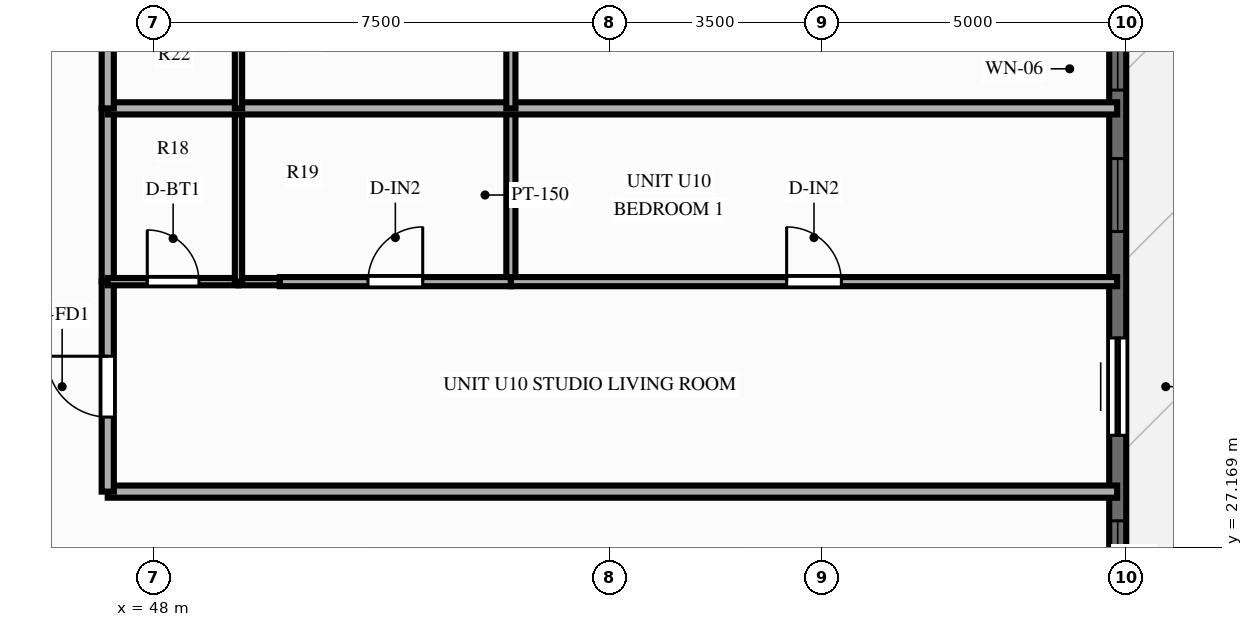
"""IFC4 building model, lengths in metres.
Left out: names, types, materials, properties, quantities, classifications, styles, units other than length and angle.
Written with IfcOpenShell. Run it as: python <this file> out.ifc"""

import sys

from ifc_helpers import new_model, si_unit, direction, frame, frame_2d, origin, place, context, subcontext, project, spatial, rectangle, extrude, source, transform, mapped, element, fill, save


model = new_model("IFC4")
c1 = context("Model", 3, precision=1e-05, world=origin(), true_north=direction((0.0, 1.0)))
c2 = subcontext(c1, "Body", "Model", "MODEL_VIEW")
j1 = project(units=[si_unit("LENGTHUNIT", "METRE"), si_unit("PLANEANGLEUNIT", "RADIAN")], contexts=[c1])
p1 = place(None, origin())
s1 = spatial("IfcSite", under=j1, at=p1, CompositionType="ELEMENT")
p2 = place(p1, origin())
s2 = spatial("IfcBuilding", under=s1, at=p2, CompositionType="ELEMENT")
p3 = place(p2, frame((0.0, 0.0, 92.85)))
s3 = spatial("IfcBuildingStorey", under=s2, at=p3, CompositionType="ELEMENT", Elevation=92.85)
p4 = place(p3, frame((63.86, 7.2, 0.0), z_axis=(0.0, 0.0, 1.0), x_axis=(0.0, 1.0, 0.0)))
e1 = element("IfcWall", 1, at=p4, inside=s3, PredefinedType="SOLIDWALL", context=c2, shape_type="SweptSolid", body=[
    extrude(rectangle(XDim=39.6, YDim=0.28, at=frame_2d((19.8, 0.0))), origin(), (0.0, 0.0, 1.0), 2.28),
])
p5 = place(p4, frame((1.374, 0.0, 0.25)))
e2 = element("IfcOpeningElement", 2, at=p5, cuts=e1, PredefinedType="OPENING", context=c2, shape_type="SweptSolid", body=[
    extrude(rectangle(XDim=1.2, YDim=1.5, at=frame_2d((0.6, 0.75))), frame((0.0, 0.152, 0.0), z_axis=(0.0, -1.0, 0.0), x_axis=(1.0, 0.0, 0.0)), (0.0, 0.0, 1.0), 0.304),
])
p6 = place(p4, frame((4.458, 0.0, 0.25)))
e3 = element("IfcOpeningElement", 3, at=p6, cuts=e1, PredefinedType="OPENING", context=c2, shape_type="SweptSolid", body=[
    extrude(rectangle(XDim=1.2, YDim=1.5, at=frame_2d((0.6, 0.75))), frame((0.0, 0.152, 0.0), z_axis=(0.0, -1.0, 0.0), x_axis=(1.0, 0.0, 0.0)), (0.0, 0.0, 1.0), 0.304),
])
p7 = place(p4, frame((7.382, 0.0, 0.25)))
e4 = element("IfcOpeningElement", 4, at=p7, cuts=e1, PredefinedType="OPENING", context=c2, shape_type="SweptSolid", body=[
    extrude(rectangle(XDim=1.2, YDim=1.5, at=frame_2d((0.6, 0.75))), frame((0.0, 0.152, 0.0), z_axis=(0.0, -1.0, 0.0), x_axis=(1.0, 0.0, 0.0)), (0.0, 0.0, 1.0), 0.304),
])
p8 = place(p4, frame((11.508, 0.0, 0.25)))
e5 = element("IfcOpeningElement", 5, at=p8, cuts=e1, PredefinedType="OPENING", context=c2, shape_type="SweptSolid", body=[
    extrude(rectangle(XDim=0.7, YDim=1.5, at=frame_2d((0.35, 0.75))), frame((0.0, 0.152, 0.0), z_axis=(0.0, -1.0, 0.0), x_axis=(1.0, 0.0, 0.0)), (0.0, 0.0, 1.0), 0.304),
])
p9 = place(p4, frame((13.409, 0.0, 0.25)))
e6 = element("IfcOpeningElement", 6, at=p9, cuts=e1, PredefinedType="OPENING", context=c2, shape_type="SweptSolid", body=[
    extrude(rectangle(XDim=1.2, YDim=1.5, at=frame_2d((0.6, 0.75))), frame((0.0, 0.152, 0.0), z_axis=(0.0, -1.0, 0.0), x_axis=(1.0, 0.0, 0.0)), (0.0, 0.0, 1.0), 0.304),
])
p10 = place(p4, frame((16.468, 0.0, 0.25)))
e7 = element("IfcOpeningElement", 7, at=p10, cuts=e1, PredefinedType="OPENING", context=c2, shape_type="SweptSolid", body=[
    extrude(rectangle(XDim=1.2, YDim=1.5, at=frame_2d((0.6, 0.75))), frame((0.0, 0.152, 0.0), z_axis=(0.0, -1.0, 0.0), x_axis=(1.0, 0.0, 0.0)), (0.0, 0.0, 1.0), 0.304),
])
p11 = place(p4, frame((19.2, 0.0, 0.25)))
e8 = element("IfcOpeningElement", 8, at=p11, cuts=e1, PredefinedType="OPENING", context=c2, shape_type="SweptSolid", body=[
    extrude(rectangle(XDim=1.2, YDim=1.5, at=frame_2d((0.6, 0.75))), frame((0.0, 0.152, 0.0), z_axis=(0.0, -1.0, 0.0), x_axis=(1.0, 0.0, 0.0)), (0.0, 0.0, 1.0), 0.304),
])
p12 = place(p4, frame((23.407, 0.0, 0.0), z_axis=(0.0, 0.0, 1.0), x_axis=(-1.0, 0.0, 0.0)))
e9 = element("IfcOpeningElement", 9, at=p12, cuts=e1, PredefinedType="OPENING", context=c2, shape_type="SweptSolid", body=[
    extrude(rectangle(XDim=1.6, YDim=2.15, at=frame_2d((0.8, 1.075))), frame((0.0, 0.152, 0.0), z_axis=(0.0, -1.0, 0.0), x_axis=(1.0, 0.0, 0.0)), (0.0, 0.0, 1.0), 0.304),
])
p13 = place(p4, frame((25.159, 0.0, 0.25)))
e10 = element("IfcOpeningElement", 10, at=p13, cuts=e1, PredefinedType="OPENING", context=c2, shape_type="SweptSolid", body=[
    extrude(rectangle(XDim=1.2, YDim=1.5, at=frame_2d((0.6, 0.75))), frame((0.0, 0.152, 0.0), z_axis=(0.0, -1.0, 0.0), x_axis=(1.0, 0.0, 0.0)), (0.0, 0.0, 1.0), 0.304),
])
p14 = place(p4, frame((27.484, 0.0, 0.25)))
e11 = element("IfcOpeningElement", 11, at=p14, cuts=e1, PredefinedType="OPENING", context=c2, shape_type="SweptSolid", body=[
    extrude(rectangle(XDim=0.7, YDim=1.5, at=frame_2d((0.35, 0.75))), frame((0.0, 0.152, 0.0), z_axis=(0.0, -1.0, 0.0), x_axis=(1.0, 0.0, 0.0)), (0.0, 0.0, 1.0), 0.304),
])
p15 = place(p4, frame((31.111, 0.0, 0.25)))
e12 = element("IfcOpeningElement", 12, at=p15, cuts=e1, PredefinedType="OPENING", context=c2, shape_type="SweptSolid", body=[
    extrude(rectangle(XDim=1.2, YDim=1.5, at=frame_2d((0.6, 0.75))), frame((0.0, 0.152, 0.0), z_axis=(0.0, -1.0, 0.0), x_axis=(1.0, 0.0, 0.0)), (0.0, 0.0, 1.0), 0.304),
])
p16 = place(p4, frame((34.109, 0.0, 0.25)))
e13 = element("IfcOpeningElement", 13, at=p16, cuts=e1, PredefinedType="OPENING", context=c2, shape_type="SweptSolid", body=[
    extrude(rectangle(XDim=1.2, YDim=1.5, at=frame_2d((0.6, 0.75))), frame((0.0, 0.152, 0.0), z_axis=(0.0, -1.0, 0.0), x_axis=(1.0, 0.0, 0.0)), (0.0, 0.0, 1.0), 0.304),
])
p17 = place(p4, frame((37.101, 0.0, 0.25)))
e14 = element("IfcOpeningElement", 14, at=p17, cuts=e1, PredefinedType="OPENING", context=c2, shape_type="SweptSolid", body=[
    extrude(rectangle(XDim=1.2, YDim=1.5, at=frame_2d((0.6, 0.75))), frame((0.0, 0.152, 0.0), z_axis=(0.0, -1.0, 0.0), x_axis=(1.0, 0.0, 0.0)), (0.0, 0.0, 1.0), 0.304),
])
p18 = place(p3, frame((47.25, 28.08, 0.0), z_axis=(0.0, 0.0, 1.0), x_axis=(1.0, 0.0, 0.0)))
e15 = element("IfcWall", 15, at=p18, inside=s3, PredefinedType="PARTITIONING", context=c2, shape_type="SweptSolid", body=[
    extrude(rectangle(XDim=16.6, YDim=0.2, at=frame_2d((8.3, 0.0))), origin(), (0.0, 0.0, 1.0), 2.79),
])
p19 = place(p3, frame((47.25, 28.08, 0.0), z_axis=(0.0, 0.0, 1.0), x_axis=(0.0, 1.0, 0.0)))
e16 = element("IfcWall", 16, at=p19, inside=s3, PredefinedType="PARTITIONING", context=c2, shape_type="SweptSolid", body=[
    extrude(rectangle(XDim=3.454, YDim=0.2, at=frame_2d((1.727, 0.0))), origin(), (0.0, 0.0, 1.0), 2.79),
])
p20 = place(p19, frame((1.227, 0.0, 0.0)))
e17 = element("IfcOpeningElement", 17, at=p20, cuts=e16, PredefinedType="OPENING", context=c2, shape_type="SweptSolid", body=[
    extrude(rectangle(XDim=1.0, YDim=2.15, at=frame_2d((0.5, 1.075))), frame((0.0, 0.112, 0.0), z_axis=(0.0, -1.0, 0.0), x_axis=(1.0, 0.0, 0.0)), (0.0, 0.0, 1.0), 0.224),
])
p21 = place(p3, frame((47.25, 31.534, 0.0), z_axis=(0.0, 0.0, 1.0), x_axis=(0.0, 1.0, 0.0)))
e18 = element("IfcWall", 18, at=p21, inside=s3, PredefinedType="PARTITIONING", context=c2, shape_type="SweptSolid", body=[
    extrude(rectangle(XDim=2.85, YDim=0.2, at=frame_2d((1.425, 0.0))), origin(), (0.0, 0.0, 1.0), 2.79),
])
p22 = place(p3, frame((47.25, 31.534, 0.0), z_axis=(0.0, 0.0, 1.0), x_axis=(1.0, 0.0, 0.0)))
e19 = element("IfcWall", 19, at=p22, inside=s3, PredefinedType="PARTITIONING", context=c2, shape_type="SweptSolid", body=[
    extrude(rectangle(XDim=2.15, YDim=0.12, at=frame_2d((1.075, 0.0))), origin(), (0.0, 0.0, 1.0), 2.79),
])
p23 = place(p22, frame((0.65, 0.0, 0.0)))
e20 = element("IfcOpeningElement", 20, at=p23, cuts=e19, PredefinedType="OPENING", context=c2, shape_type="SweptSolid", body=[
    extrude(rectangle(XDim=0.85, YDim=2.05, at=frame_2d((0.425, 1.025))), frame((0.0, 0.072, 0.0), z_axis=(0.0, -1.0, 0.0), x_axis=(1.0, 0.0, 0.0)), (0.0, 0.0, 1.0), 0.144),
])
p24 = place(p3, frame((49.4, 31.534, 0.0), z_axis=(0.0, 0.0, 1.0), x_axis=(1.0, 0.0, 0.0)))
e21 = element("IfcWall", 21, at=p24, inside=s3, PredefinedType="PARTITIONING", context=c2, shape_type="SweptSolid", body=[
    extrude(rectangle(XDim=0.68, YDim=0.12, at=frame_2d((0.34, 0.0))), origin(), (0.0, 0.0, 1.0), 2.79),
])
p25 = place(p3, frame((49.4, 31.534, 0.0), z_axis=(0.0, 0.0, 1.0), x_axis=(0.0, 1.0, 0.0)))
e22 = element("IfcWall", 22, at=p25, inside=s3, PredefinedType="PARTITIONING", context=c2, shape_type="SweptSolid", body=[
    extrude(rectangle(XDim=2.85, YDim=0.12, at=frame_2d((1.425, 0.0))), origin(), (0.0, 0.0, 1.0), 2.79),
])
p26 = place(p3, frame((53.88, 31.534, 0.0), z_axis=(0.0, 0.0, 1.0), x_axis=(0.0, 1.0, 0.0)))
e23 = element("IfcWall", 23, at=p26, inside=s3, PredefinedType="PARTITIONING", context=c2, shape_type="SweptSolid", body=[
    extrude(rectangle(XDim=2.85, YDim=0.15, at=frame_2d((1.425, 0.0))), origin(), (0.0, 0.0, 1.0), 2.79),
])
p27 = place(p3, frame((50.08, 31.534, 0.0), z_axis=(0.0, 0.0, 1.0), x_axis=(1.0, 0.0, 0.0)))
e24 = element("IfcWall", 24, at=p27, inside=s3, PredefinedType="PARTITIONING", context=c2, shape_type="SweptSolid", body=[
    extrude(rectangle(XDim=3.8, YDim=0.15, at=frame_2d((1.9, 0.0))), origin(), (0.0, 0.0, 1.0), 2.79),
])
p28 = place(p27, frame((1.45, 0.0, 0.0)))
e25 = element("IfcOpeningElement", 25, at=p28, cuts=e24, PredefinedType="OPENING", context=c2, shape_type="SweptSolid", body=[
    extrude(rectangle(XDim=0.9, YDim=2.1, at=frame_2d((0.45, 1.05))), frame((0.0, 0.087, 0.0), z_axis=(0.0, -1.0, 0.0), x_axis=(1.0, 0.0, 0.0)), (0.0, 0.0, 1.0), 0.174),
])
p29 = place(p3, frame((53.88, 31.534, 0.0), z_axis=(0.0, 0.0, 1.0), x_axis=(1.0, 0.0, 0.0)))
e26 = element("IfcWall", 26, at=p29, inside=s3, PredefinedType="PARTITIONING", context=c2, shape_type="SweptSolid", body=[
    extrude(rectangle(XDim=9.97, YDim=0.15, at=frame_2d((4.985, 0.0))), origin(), (0.0, 0.0, 1.0), 2.79),
])
p30 = place(p29, frame((4.535, 0.0, 0.0)))
e27 = element("IfcOpeningElement", 27, at=p30, cuts=e26, PredefinedType="OPENING", context=c2, shape_type="SweptSolid", body=[
    extrude(rectangle(XDim=0.9, YDim=2.1, at=frame_2d((0.45, 1.05))), frame((0.0, 0.087, 0.0), z_axis=(0.0, -1.0, 0.0), x_axis=(1.0, 0.0, 0.0)), (0.0, 0.0, 1.0), 0.174),
])
p31 = place(p3, frame((47.25, 34.384, 0.0), z_axis=(0.0, 0.0, 1.0), x_axis=(1.0, 0.0, 0.0)))
e28 = element("IfcWall", 28, at=p31, inside=s3, PredefinedType="PARTITIONING", context=c2, shape_type="SweptSolid", body=[
    extrude(rectangle(XDim=16.6, YDim=0.2, at=frame_2d((8.3, 0.0))), origin(), (0.0, 0.0, 1.0), 2.79),
])
p32 = place(p3, frame((47.25, 34.384, 0.0), z_axis=(0.0, 0.0, 1.0), x_axis=(0.0, 1.0, 0.0)))
e29 = element("IfcWall", 29, at=p32, inside=s3, PredefinedType="PARTITIONING", context=c2, shape_type="SweptSolid", body=[
    extrude(rectangle(XDim=2.937, YDim=0.2, at=frame_2d((1.468, 0.0))), origin(), (0.0, 0.0, 1.0), 2.79),
])
p33 = place(p3, frame((49.4, 34.384, 0.0), z_axis=(0.0, 0.0, 1.0), x_axis=(0.0, 1.0, 0.0)))
e30 = element("IfcWall", 30, at=p33, inside=s3, PredefinedType="PARTITIONING", context=c2, shape_type="SweptSolid", body=[
    extrude(rectangle(XDim=2.937, YDim=0.12, at=frame_2d((1.468, 0.0))), origin(), (0.0, 0.0, 1.0), 2.79),
])
p34 = place(p3, frame((53.88, 34.384, 0.0), z_axis=(0.0, 0.0, 1.0), x_axis=(0.0, 1.0, 0.0)))
e31 = element("IfcWall", 31, at=p34, inside=s3, PredefinedType="PARTITIONING", context=c2, shape_type="SweptSolid", body=[
    extrude(rectangle(XDim=2.937, YDim=0.15, at=frame_2d((1.468, 0.0))), origin(), (0.0, 0.0, 1.0), 2.79),
])
m1 = source(origin(), c2, "Body", "SweptSolid", [
    extrude(rectangle(XDim=1.2, YDim=1.5, at=frame_2d((0.6, 0.75))), frame((0.0, 0.03, 0.0), z_axis=(0.0, -1.0, 0.0), x_axis=(1.0, 0.0, 0.0)), (0.0, 0.0, 1.0), 0.06),
])
p35 = place(p11, origin())
e32 = element("IfcWindow", 32, at=p35, inside=s3, PartitioningType="SINGLE_PANEL", PredefinedType="WINDOW", context=c2, shape_type="MappedRepresentation", body=[
    mapped(m1, transform((0.0, 0.0, 0.0), scale=1.0)),
])
fill(e8, e32)
m2 = source(origin(), c2, "Body", "SweptSolid", [
    extrude(rectangle(XDim=1.6, YDim=2.15, at=frame_2d((0.8, 1.075))), frame((0.0, 0.025, 0.0), z_axis=(0.0, -1.0, 0.0), x_axis=(1.0, 0.0, 0.0)), (0.0, 0.0, 1.0), 0.05),
])
p36 = place(p12, origin())
e33 = element("IfcDoor", 33, at=p36, inside=s3, OperationType="SLIDING_TO_LEFT", PredefinedType="DOOR", context=c2, shape_type="MappedRepresentation", body=[
    mapped(m2, transform((0.0, 0.0, 0.0), scale=1.0)),
])
fill(e9, e33)
p37 = place(p13, origin())
e34 = element("IfcWindow", 34, at=p37, inside=s3, PartitioningType="SINGLE_PANEL", PredefinedType="WINDOW", context=c2, shape_type="MappedRepresentation", body=[
    mapped(m1, transform((0.0, 0.0, 0.0), scale=1.0)),
])
fill(e10, e34)
m3 = source(origin(), c2, "Body", "SweptSolid", [
    extrude(rectangle(XDim=0.7, YDim=1.5, at=frame_2d((0.35, 0.75))), frame((0.0, 0.03, 0.0), z_axis=(0.0, -1.0, 0.0), x_axis=(1.0, 0.0, 0.0)), (0.0, 0.0, 1.0), 0.06),
])
p38 = place(p14, origin())
e35 = element("IfcWindow", 35, at=p38, inside=s3, PartitioningType="SINGLE_PANEL", PredefinedType="WINDOW", context=c2, shape_type="MappedRepresentation", body=[
    mapped(m3, transform((0.0, 0.0, 0.0), scale=1.0)),
])
fill(e11, e35)
m4 = source(origin(), c2, "Body", "SweptSolid", [
    extrude(rectangle(XDim=1.0, YDim=2.15, at=frame_2d((0.5, 1.075))), frame((0.0, 0.025, 0.0), z_axis=(0.0, -1.0, 0.0), x_axis=(1.0, 0.0, 0.0)), (0.0, 0.0, 1.0), 0.05),
])
p39 = place(p20, origin())
e36 = element("IfcDoor", 36, at=p39, inside=s3, OperationType="SINGLE_SWING_RIGHT", PredefinedType="DOOR", context=c2, shape_type="MappedRepresentation", body=[
    mapped(m4, transform((0.0, 0.0, 0.0), scale=1.0)),
])
fill(e17, e36)
m5 = source(origin(), c2, "Body", "SweptSolid", [
    extrude(rectangle(XDim=0.85, YDim=2.05, at=frame_2d((0.425, 1.025))), frame((0.0, 0.025, 0.0), z_axis=(0.0, -1.0, 0.0), x_axis=(1.0, 0.0, 0.0)), (0.0, 0.0, 1.0), 0.05),
])
p40 = place(p23, origin())
e37 = element("IfcDoor", 37, at=p40, inside=s3, OperationType="SINGLE_SWING_LEFT", PredefinedType="DOOR", context=c2, shape_type="MappedRepresentation", body=[
    mapped(m5, transform((0.0, 0.0, 0.0), scale=1.0)),
])
fill(e20, e37)
m6 = source(origin(), c2, "Body", "SweptSolid", [
    extrude(rectangle(XDim=0.9, YDim=2.1, at=frame_2d((0.45, 1.05))), frame((0.0, 0.025, 0.0), z_axis=(0.0, -1.0, 0.0), x_axis=(1.0, 0.0, 0.0)), (0.0, 0.0, 1.0), 0.05),
])
p41 = place(p28, origin())
e38 = element("IfcDoor", 38, at=p41, inside=s3, OperationType="SINGLE_SWING_RIGHT", PredefinedType="DOOR", context=c2, shape_type="MappedRepresentation", body=[
    mapped(m6, transform((0.0, 0.0, 0.0), scale=1.0)),
])
fill(e25, e38)
p42 = place(p30, origin())
e39 = element("IfcDoor", 39, at=p42, inside=s3, OperationType="SINGLE_SWING_LEFT", PredefinedType="DOOR", context=c2, shape_type="MappedRepresentation", body=[
    mapped(m6, transform((0.0, 0.0, 0.0), scale=1.0)),
])
fill(e27, e39)
save(model, sys.argv[1])
